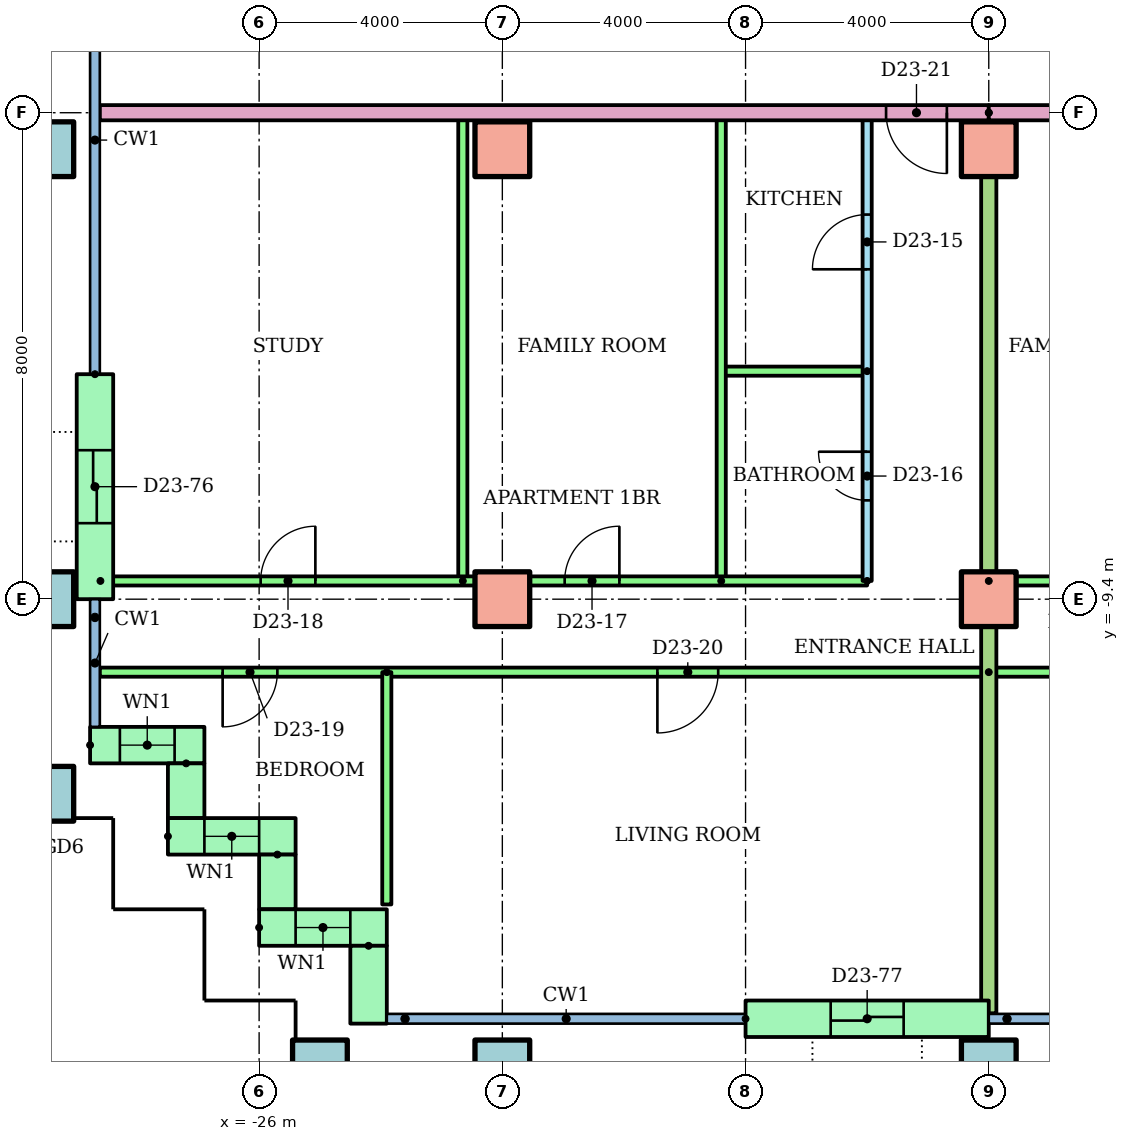
"""IFC4 building model, lengths in metres.
Left out: names, types, materials, properties, quantities, classifications, styles, units other than length and angle.
Written with IfcOpenShell. Run it as: python <this file> out.ifc"""

import sys

from ifc_helpers import new_model, si_unit, direction, frame, frame_2d, origin, origin_2d, place, context, subcontext, project, spatial, rectangle, hollow_rectangle, extrude, element, fill, save


model = new_model("IFC4")
c1 = context("Model", 3, precision=1e-05, world=origin(), true_north=direction((0.0, 1.0)))
c2 = subcontext(c1, "Body", "Model", "MODEL_VIEW")
j1 = project(units=[si_unit("LENGTHUNIT", "METRE"), si_unit("PLANEANGLEUNIT", "RADIAN")], contexts=[c1])
p1 = place(None, origin())
s1 = spatial("IfcSite", under=j1, at=p1, CompositionType="ELEMENT")
p2 = place(p1, origin())
s2 = spatial("IfcBuilding", under=s1, at=p2, CompositionType="ELEMENT")
p3 = place(p2, frame((0.0, 0.0, 90.3)))
s3 = spatial("IfcBuildingStorey", under=s2, at=p3, CompositionType="ELEMENT", Elevation=90.3)
for number, where in (
    (1, (-25.0, -17.1, 0.0)),
    (2, (-22.0, -17.1, 0.0)),
    (3, (-14.0, -17.1, 0.0)),
    (4, (-29.5, -12.6, 0.0)),
    (5, (-29.5, -9.4, 0.0)),
):
    element("IfcColumn", number, at=place(p3, frame(where)), inside=s3, PredefinedType="COLUMN", context=c2, shape_type="SweptSolid", body=[
        extrude(hollow_rectangle(XDim=0.9, YDim=0.9, WallThickness=0.045, at=origin_2d()), origin(), (0.0, 0.0, 1.0), 3.2),
    ])
for number, where in (
    (6, (-22.0, -9.4, 0.0)),
    (7, (-14.0, -9.4, 0.0)),
):
    element("IfcColumn", number, at=place(p3, frame(where)), inside=s3, PredefinedType="COLUMN", context=c2, shape_type="SweptSolid", body=[
        extrude(rectangle(XDim=0.9, YDim=0.9, at=origin_2d()), origin(), (0.0, 0.0, 1.0), 3.2),
    ])
p4 = place(p3, frame((-29.5, -2.0, 0.0)))
e8 = element("IfcColumn", 8, at=p4, inside=s3, PredefinedType="COLUMN", context=c2, shape_type="SweptSolid", body=[
    extrude(hollow_rectangle(XDim=0.9, YDim=0.9, WallThickness=0.045, at=origin_2d()), origin(), (0.0, 0.0, 1.0), 3.2),
])
for number, where in (
    (9, (-22.0, -2.0, 0.0)),
    (10, (-14.0, -2.0, 0.0)),
):
    element("IfcColumn", number, at=place(p3, frame(where)), inside=s3, PredefinedType="COLUMN", context=c2, shape_type="SweptSolid", body=[
        extrude(rectangle(XDim=0.9, YDim=0.9, at=origin_2d()), origin(), (0.0, 0.0, 1.0), 3.2),
    ])
p5 = place(p3, frame((-28.7, -5.7, 0.0), z_axis=(0.0, 0.0, 1.0), x_axis=(0.0, -1.0, 0.0)))
e11 = element("IfcWall", 11, at=p5, inside=s3, PredefinedType="STANDARD", context=c2, shape_type="SweptSolid", body=[
    extrude(rectangle(XDim=3.7, YDim=0.6, at=frame_2d((1.85, 0.0))), origin(), (0.0, 0.0, 1.0), 2.92),
])
p6 = place(p5, frame((1.25, 0.0, 0.0)))
e12 = element("IfcOpeningElement", 12, at=p6, cuts=e11, PredefinedType="OPENING", context=c2, shape_type="SweptSolid", body=[
    extrude(rectangle(XDim=1.2, YDim=2.1, at=frame_2d((0.6, 1.05))), frame((0.0, 0.31, 0.0), z_axis=(0.0, -1.0, 0.0), x_axis=(1.0, 0.0, 0.0)), (0.0, 0.0, 1.0), 0.62),
])
p7 = place(p3, frame((-28.78, -11.8, 0.0)))
e13 = element("IfcWall", 13, at=p7, inside=s3, PredefinedType="STANDARD", context=c2, shape_type="SweptSolid", body=[
    extrude(rectangle(XDim=1.88, YDim=0.6, at=frame_2d((0.94, 0.0))), origin(), (0.0, 0.0, 1.0), 2.92),
])
p8 = place(p7, frame((0.49, 0.0, 0.9)))
e14 = element("IfcOpeningElement", 14, at=p8, cuts=e13, PredefinedType="OPENING", context=c2, shape_type="SweptSolid", body=[
    extrude(rectangle(XDim=0.9, YDim=1.5, at=frame_2d((0.45, 0.75))), frame((0.0, 0.31, 0.0), z_axis=(0.0, -1.0, 0.0), x_axis=(1.0, 0.0, 0.0)), (0.0, 0.0, 1.0), 0.62),
])
p9 = place(p3, frame((-27.2, -12.1, 0.0), z_axis=(0.0, 0.0, 1.0), x_axis=(0.0, -1.0, 0.0)))
e15 = element("IfcWall", 15, at=p9, inside=s3, PredefinedType="STANDARD", context=c2, shape_type="SweptSolid", body=[
    extrude(rectangle(XDim=0.9, YDim=0.6, at=frame_2d((0.45, 0.0))), origin(), (0.0, 0.0, 1.0), 2.92),
])
p10 = place(p3, frame((-27.5, -13.3, 0.0)))
e16 = element("IfcWall", 16, at=p10, inside=s3, PredefinedType="STANDARD", context=c2, shape_type="SweptSolid", body=[
    extrude(rectangle(XDim=2.1, YDim=0.6, at=frame_2d((1.05, 0.0))), origin(), (0.0, 0.0, 1.0), 2.92),
])
p11 = place(p10, frame((0.6, 0.0, 0.9)))
e17 = element("IfcOpeningElement", 17, at=p11, cuts=e16, PredefinedType="OPENING", context=c2, shape_type="SweptSolid", body=[
    extrude(rectangle(XDim=0.9, YDim=1.5, at=frame_2d((0.45, 0.75))), frame((0.0, 0.31, 0.0), z_axis=(0.0, -1.0, 0.0), x_axis=(1.0, 0.0, 0.0)), (0.0, 0.0, 1.0), 0.62),
])
p12 = place(p3, frame((-25.7, -13.6, 0.0), z_axis=(0.0, 0.0, 1.0), x_axis=(0.0, -1.0, 0.0)))
e18 = element("IfcWall", 18, at=p12, inside=s3, PredefinedType="STANDARD", context=c2, shape_type="SweptSolid", body=[
    extrude(rectangle(XDim=0.9, YDim=0.6, at=frame_2d((0.45, 0.0))), origin(), (0.0, 0.0, 1.0), 2.92),
])
p13 = place(p3, frame((-26.0, -14.8, 0.0)))
e19 = element("IfcWall", 19, at=p13, inside=s3, PredefinedType="STANDARD", context=c2, shape_type="SweptSolid", body=[
    extrude(rectangle(XDim=2.1, YDim=0.6, at=frame_2d((1.05, 0.0))), origin(), (0.0, 0.0, 1.0), 2.92),
])
p14 = place(p13, frame((0.6, 0.0, 0.9)))
e20 = element("IfcOpeningElement", 20, at=p14, cuts=e19, PredefinedType="OPENING", context=c2, shape_type="SweptSolid", body=[
    extrude(rectangle(XDim=0.9, YDim=1.5, at=frame_2d((0.45, 0.75))), frame((0.0, 0.31, 0.0), z_axis=(0.0, -1.0, 0.0), x_axis=(1.0, 0.0, 0.0)), (0.0, 0.0, 1.0), 0.62),
])
p15 = place(p3, frame((-24.2, -15.1, 0.0), z_axis=(0.0, 0.0, 1.0), x_axis=(0.0, -1.0, 0.0)))
e21 = element("IfcWall", 21, at=p15, inside=s3, PredefinedType="STANDARD", context=c2, shape_type="SweptSolid", body=[
    extrude(rectangle(XDim=1.28, YDim=0.6, at=frame_2d((0.64, 0.0))), origin(), (0.0, 0.0, 1.0), 2.92),
])
p16 = place(p3, frame((-18.0, -16.3, 0.0)))
e22 = element("IfcWall", 22, at=p16, inside=s3, PredefinedType="STANDARD", context=c2, shape_type="SweptSolid", body=[
    extrude(rectangle(XDim=4.0, YDim=0.6, at=frame_2d((2.0, 0.0))), origin(), (0.0, 0.0, 1.0), 2.92),
])
p17 = place(p16, frame((1.4, 0.0, 0.0)))
e23 = element("IfcOpeningElement", 23, at=p17, cuts=e22, PredefinedType="OPENING", context=c2, shape_type="SweptSolid", body=[
    extrude(rectangle(XDim=1.2, YDim=2.1, at=frame_2d((0.6, 1.05))), frame((0.0, 0.31, 0.0), z_axis=(0.0, -1.0, 0.0), x_axis=(1.0, 0.0, 0.0)), (0.0, 0.0, 1.0), 0.62),
])
p18 = place(p3, frame((-16.0, -9.1, 0.0), z_axis=(0.0, 0.0, 1.0), x_axis=(0.0, 1.0, 0.0)))
e24 = element("IfcWall", 24, at=p18, inside=s3, PredefinedType="PARTITIONING", context=c2, shape_type="SweptSolid", body=[
    extrude(rectangle(XDim=7.7, YDim=0.15, at=frame_2d((3.85, 0.0))), origin(), (0.0, 0.0, 1.0), 2.4),
])
p19 = place(p18, frame((5.125, 0.0, 0.0)))
e25 = element("IfcOpeningElement", 25, at=p19, cuts=e24, PredefinedType="OPENING", context=c2, shape_type="SweptSolid", body=[
    extrude(rectangle(XDim=0.9, YDim=2.1, at=frame_2d((0.45, 1.05))), frame((0.0, 0.085, 0.0), z_axis=(0.0, -1.0, 0.0), x_axis=(1.0, 0.0, 0.0)), (0.0, 0.0, 1.0), 0.17),
])
p20 = place(p18, frame((1.325, 0.0, 0.0)))
e26 = element("IfcOpeningElement", 26, at=p20, cuts=e24, PredefinedType="OPENING", context=c2, shape_type="SweptSolid", body=[
    extrude(rectangle(XDim=0.8, YDim=2.1, at=frame_2d((0.4, 1.05))), frame((0.0, 0.085, 0.0), z_axis=(0.0, -1.0, 0.0), x_axis=(1.0, 0.0, 0.0)), (0.0, 0.0, 1.0), 0.17),
])
p21 = place(p3, frame((-16.0, -5.65, 0.0), z_axis=(0.0, 0.0, 1.0), x_axis=(-1.0, 0.0, 0.0)))
e27 = element("IfcWall", 27, at=p21, inside=s3, PredefinedType="PARTITIONING", context=c2, shape_type="SweptSolid", body=[
    extrude(rectangle(XDim=2.4, YDim=0.15, at=frame_2d((1.2, 0.0))), origin(), (0.0, 0.0, 1.0), 2.4),
])
for number, where, z_axis, x_axis in (
    (28, (-18.4, -9.1, 0.0), (0.0, 0.0, 1.0), (0.0, 1.0, 0.0)),
    (29, (-22.65, -9.1, 0.0), (0.0, 0.0, 1.0), (0.0, 1.0, 0.0)),
):
    element("IfcWall", number, at=place(p3, frame(where, z_axis=z_axis, x_axis=x_axis)), inside=s3, PredefinedType="PARTITIONING", context=c2, shape_type="SweptSolid", body=[
        extrude(rectangle(XDim=7.7, YDim=0.15, at=frame_2d((3.85, 0.0))), origin(), (0.0, 0.0, 1.0), 2.4),
    ])
p22 = place(p3, frame((-28.61, -9.1, 0.0)))
e30 = element("IfcWall", 30, at=p22, inside=s3, PredefinedType="PARTITIONING", context=c2, shape_type="SweptSolid", body=[
    extrude(rectangle(XDim=12.61, YDim=0.15, at=frame_2d((6.305, 0.0))), origin(), (0.0, 0.0, 1.0), 2.4),
])
p23 = place(p22, frame((7.635, 0.0, 0.0)))
e31 = element("IfcOpeningElement", 31, at=p23, cuts=e30, PredefinedType="OPENING", context=c2, shape_type="SweptSolid", body=[
    extrude(rectangle(XDim=0.9, YDim=2.1, at=frame_2d((0.45, 1.05))), frame((0.0, 0.085, 0.0), z_axis=(0.0, -1.0, 0.0), x_axis=(1.0, 0.0, 0.0)), (0.0, 0.0, 1.0), 0.17),
])
p24 = place(p22, frame((2.635, 0.0, 0.0)))
e32 = element("IfcOpeningElement", 32, at=p24, cuts=e30, PredefinedType="OPENING", context=c2, shape_type="SweptSolid", body=[
    extrude(rectangle(XDim=0.9, YDim=2.1, at=frame_2d((0.45, 1.05))), frame((0.0, 0.085, 0.0), z_axis=(0.0, -1.0, 0.0), x_axis=(1.0, 0.0, 0.0)), (0.0, 0.0, 1.0), 0.17),
])
p25 = place(p3, frame((-14.0, -10.6, 0.0), z_axis=(0.0, 0.0, 1.0), x_axis=(-1.0, 0.0, 0.0)))
e33 = element("IfcWall", 33, at=p25, inside=s3, PredefinedType="PARTITIONING", context=c2, shape_type="SweptSolid", body=[
    extrude(rectangle(XDim=14.62, YDim=0.15, at=frame_2d((7.31, 0.0))), origin(), (0.0, 0.0, 1.0), 2.4),
])
p26 = place(p25, frame((11.7, 0.0, 0.0)))
e34 = element("IfcOpeningElement", 34, at=p26, cuts=e33, PredefinedType="OPENING", context=c2, shape_type="SweptSolid", body=[
    extrude(rectangle(XDim=0.9, YDim=2.1, at=frame_2d((0.45, 1.05))), frame((0.0, 0.085, 0.0), z_axis=(0.0, -1.0, 0.0), x_axis=(1.0, 0.0, 0.0)), (0.0, 0.0, 1.0), 0.17),
])
p27 = place(p25, frame((4.45, 0.0, 0.0)))
e35 = element("IfcOpeningElement", 35, at=p27, cuts=e33, PredefinedType="OPENING", context=c2, shape_type="SweptSolid", body=[
    extrude(rectangle(XDim=1.0, YDim=2.1, at=frame_2d((0.5, 1.05))), frame((0.0, 0.085, 0.0), z_axis=(0.0, -1.0, 0.0), x_axis=(1.0, 0.0, 0.0)), (0.0, 0.0, 1.0), 0.17),
])
p28 = place(p3, frame((-23.9, -10.6, 0.0), z_axis=(0.0, 0.0, 1.0), x_axis=(0.0, -1.0, 0.0)))
e36 = element("IfcWall", 36, at=p28, inside=s3, PredefinedType="PARTITIONING", context=c2, shape_type="SweptSolid", body=[
    extrude(rectangle(XDim=3.82, YDim=0.15, at=frame_2d((1.91, 0.0))), origin(), (0.0, 0.0, 1.0), 2.4),
])
p29 = place(p3, frame((-14.0, -9.1, 0.0)))
e37 = element("IfcWall", 37, at=p29, inside=s3, PredefinedType="PARTITIONING", context=c2, shape_type="SweptSolid", body=[
    extrude(rectangle(XDim=14.0, YDim=0.15, at=frame_2d((7.0, 0.0))), origin(), (0.0, 0.0, 1.0), 2.4),
])
p30 = place(p29, frame((8.775, 0.0, 0.0)))
e38 = element("IfcOpeningElement", 38, at=p30, cuts=e37, PredefinedType="OPENING", context=c2, shape_type="SweptSolid", body=[
    extrude(rectangle(XDim=0.9, YDim=2.1, at=frame_2d((0.45, 1.05))), frame((0.0, 0.085, 0.0), z_axis=(0.0, -1.0, 0.0), x_axis=(1.0, 0.0, 0.0)), (0.0, 0.0, 1.0), 0.17),
])
p31 = place(p29, frame((4.525, 0.0, 0.0)))
e39 = element("IfcOpeningElement", 39, at=p31, cuts=e37, PredefinedType="OPENING", context=c2, shape_type="SweptSolid", body=[
    extrude(rectangle(XDim=0.9, YDim=2.1, at=frame_2d((0.45, 1.05))), frame((0.0, 0.085, 0.0), z_axis=(0.0, -1.0, 0.0), x_axis=(1.0, 0.0, 0.0)), (0.0, 0.0, 1.0), 0.17),
])
p32 = place(p29, frame((1.1, 0.0, 0.0)))
e40 = element("IfcOpeningElement", 40, at=p32, cuts=e37, PredefinedType="OPENING", context=c2, shape_type="SweptSolid", body=[
    extrude(rectangle(XDim=0.9, YDim=2.1, at=frame_2d((0.45, 1.05))), frame((0.0, 0.085, 0.0), z_axis=(0.0, -1.0, 0.0), x_axis=(1.0, 0.0, 0.0)), (0.0, 0.0, 1.0), 0.17),
])
p33 = place(p3, frame((2.0, -10.6, 0.0), z_axis=(0.0, 0.0, 1.0), x_axis=(-1.0, 0.0, 0.0)))
e41 = element("IfcWall", 41, at=p33, inside=s3, PredefinedType="PARTITIONING", context=c2, shape_type="SweptSolid", body=[
    extrude(rectangle(XDim=16.0, YDim=0.15, at=frame_2d((8.0, 0.0))), origin(), (0.0, 0.0, 1.0), 2.4),
])
p34 = place(p33, frame((13.55, 0.0, 0.0)))
e42 = element("IfcOpeningElement", 42, at=p34, cuts=e41, PredefinedType="OPENING", context=c2, shape_type="SweptSolid", body=[
    extrude(rectangle(XDim=0.9, YDim=2.1, at=frame_2d((0.45, 1.05))), frame((0.0, 0.085, 0.0), z_axis=(0.0, -1.0, 0.0), x_axis=(1.0, 0.0, 0.0)), (0.0, 0.0, 1.0), 0.17),
])
p35 = place(p33, frame((9.55, 0.0, 0.0)))
e43 = element("IfcOpeningElement", 43, at=p35, cuts=e41, PredefinedType="OPENING", context=c2, shape_type="SweptSolid", body=[
    extrude(rectangle(XDim=0.9, YDim=2.1, at=frame_2d((0.45, 1.05))), frame((0.0, 0.085, 0.0), z_axis=(0.0, -1.0, 0.0), x_axis=(1.0, 0.0, 0.0)), (0.0, 0.0, 1.0), 0.17),
])
p36 = place(p33, frame((5.55, 0.0, 0.0)))
e44 = element("IfcOpeningElement", 44, at=p36, cuts=e41, PredefinedType="OPENING", context=c2, shape_type="SweptSolid", body=[
    extrude(rectangle(XDim=0.9, YDim=2.1, at=frame_2d((0.45, 1.05))), frame((0.0, 0.085, 0.0), z_axis=(0.0, -1.0, 0.0), x_axis=(1.0, 0.0, 0.0)), (0.0, 0.0, 1.0), 0.17),
])
p37 = place(p33, frame((1.5, 0.0, 0.0)))
e45 = element("IfcOpeningElement", 45, at=p37, cuts=e41, PredefinedType="OPENING", context=c2, shape_type="SweptSolid", body=[
    extrude(rectangle(XDim=1.0, YDim=2.1, at=frame_2d((0.5, 1.05))), frame((0.0, 0.085, 0.0), z_axis=(0.0, -1.0, 0.0), x_axis=(1.0, 0.0, 0.0)), (0.0, 0.0, 1.0), 0.17),
])
p38 = place(p3, frame((-14.0, -1.4, 0.0), z_axis=(0.0, 0.0, 1.0), x_axis=(0.0, -1.0, 0.0)))
e46 = element("IfcWall", 46, at=p38, inside=s3, PredefinedType="PARTITIONING", context=c2, shape_type="SweptSolid", body=[
    extrude(rectangle(XDim=14.81, YDim=0.25, at=frame_2d((7.405, 0.0))), origin(), (0.0, 0.0, 1.0), 2.4),
])
p39 = place(p3, frame((-14.0, -1.4, 0.0), z_axis=(0.0, 0.0, 1.0), x_axis=(-1.0, 0.0, 0.0)))
e47 = element("IfcWall", 47, at=p39, inside=s3, PredefinedType="PARTITIONING", context=c2, shape_type="SweptSolid", body=[
    extrude(rectangle(XDim=14.62, YDim=0.25, at=frame_2d((7.31, 0.0))), origin(), (0.0, 0.0, 1.0), 2.4),
])
p40 = place(p39, frame((0.689, 0.0, 0.0)))
e48 = element("IfcOpeningElement", 48, at=p40, cuts=e47, PredefinedType="OPENING", context=c2, shape_type="SweptSolid", body=[
    extrude(rectangle(XDim=1.0, YDim=2.1, at=frame_2d((0.5, 1.05))), frame((0.0, 0.135, 0.0), z_axis=(0.0, -1.0, 0.0), x_axis=(1.0, 0.0, 0.0)), (0.0, 0.0, 1.0), 0.27),
])
p41 = place(p3, frame((14.0, -1.4, 0.0), z_axis=(0.0, 0.0, 1.0), x_axis=(-1.0, 0.0, 0.0)))
e49 = element("IfcWall", 49, at=p41, inside=s3, PredefinedType="PARTITIONING", context=c2, shape_type="SweptSolid", body=[
    extrude(rectangle(XDim=28.0, YDim=0.25, at=frame_2d((14.0, 0.0))), origin(), (0.0, 0.0, 1.0), 2.4),
])
p42 = place(p41, frame((12.689, 0.0, 0.0)))
e50 = element("IfcOpeningElement", 50, at=p42, cuts=e49, PredefinedType="OPENING", context=c2, shape_type="SweptSolid", body=[
    extrude(rectangle(XDim=1.0, YDim=2.1, at=frame_2d((0.5, 1.05))), frame((0.0, 0.135, 0.0), z_axis=(0.0, -1.0, 0.0), x_axis=(1.0, 0.0, 0.0)), (0.0, 0.0, 1.0), 0.27),
])
p43 = place(p41, frame((10.311, 0.0, 0.0)))
e51 = element("IfcOpeningElement", 51, at=p43, cuts=e49, PredefinedType="OPENING", context=c2, shape_type="SweptSolid", body=[
    extrude(rectangle(XDim=1.0, YDim=2.1, at=frame_2d((0.5, 1.05))), frame((0.0, 0.135, 0.0), z_axis=(0.0, -1.0, 0.0), x_axis=(1.0, 0.0, 0.0)), (0.0, 0.0, 1.0), 0.27),
])
p44 = place(p8, origin())
e52 = element("IfcWindow", 52, at=p44, inside=s3, PartitioningType="SINGLE_PANEL", PredefinedType="WINDOW", context=c2, shape_type="SweptSolid", body=[
    extrude(rectangle(XDim=0.9, YDim=1.5, at=frame_2d((0.45, 0.75))), frame((0.0, 0.03, 0.0), z_axis=(0.0, -1.0, 0.0), x_axis=(1.0, 0.0, 0.0)), (0.0, 0.0, 1.0), 0.06),
])
fill(e14, e52)
p45 = place(p11, origin())
e53 = element("IfcWindow", 53, at=p45, inside=s3, PartitioningType="SINGLE_PANEL", PredefinedType="WINDOW", context=c2, shape_type="SweptSolid", body=[
    extrude(rectangle(XDim=0.9, YDim=1.5, at=frame_2d((0.45, 0.75))), frame((0.0, 0.03, 0.0), z_axis=(0.0, -1.0, 0.0), x_axis=(1.0, 0.0, 0.0)), (0.0, 0.0, 1.0), 0.06),
])
fill(e17, e53)
p46 = place(p14, origin())
e54 = element("IfcWindow", 54, at=p46, inside=s3, PartitioningType="SINGLE_PANEL", PredefinedType="WINDOW", context=c2, shape_type="SweptSolid", body=[
    extrude(rectangle(XDim=0.9, YDim=1.5, at=frame_2d((0.45, 0.75))), frame((0.0, 0.03, 0.0), z_axis=(0.0, -1.0, 0.0), x_axis=(1.0, 0.0, 0.0)), (0.0, 0.0, 1.0), 0.06),
])
fill(e20, e54)
p47 = place(p19, origin())
e55 = element("IfcDoor", 55, at=p47, inside=s3, OperationType="SINGLE_SWING_LEFT", PredefinedType="DOOR", context=c2, shape_type="SweptSolid", body=[
    extrude(rectangle(XDim=0.9, YDim=2.1, at=frame_2d((0.45, 1.05))), frame((0.0, 0.025, 0.0), z_axis=(0.0, -1.0, 0.0), x_axis=(1.0, 0.0, 0.0)), (0.0, 0.0, 1.0), 0.05),
])
fill(e25, e55)
p48 = place(p20, origin())
e56 = element("IfcDoor", 56, at=p48, inside=s3, OperationType="SINGLE_SWING_RIGHT", PredefinedType="DOOR", context=c2, shape_type="SweptSolid", body=[
    extrude(rectangle(XDim=0.8, YDim=2.1, at=frame_2d((0.4, 1.05))), frame((0.0, 0.025, 0.0), z_axis=(0.0, -1.0, 0.0), x_axis=(1.0, 0.0, 0.0)), (0.0, 0.0, 1.0), 0.05),
])
fill(e26, e56)
p49 = place(p23, origin())
e57 = element("IfcDoor", 57, at=p49, inside=s3, OperationType="SINGLE_SWING_RIGHT", PredefinedType="DOOR", context=c2, shape_type="SweptSolid", body=[
    extrude(rectangle(XDim=0.9, YDim=2.1, at=frame_2d((0.45, 1.05))), frame((0.0, 0.025, 0.0), z_axis=(0.0, -1.0, 0.0), x_axis=(1.0, 0.0, 0.0)), (0.0, 0.0, 1.0), 0.05),
])
fill(e31, e57)
p50 = place(p24, origin())
e58 = element("IfcDoor", 58, at=p50, inside=s3, OperationType="SINGLE_SWING_RIGHT", PredefinedType="DOOR", context=c2, shape_type="SweptSolid", body=[
    extrude(rectangle(XDim=0.9, YDim=2.1, at=frame_2d((0.45, 1.05))), frame((0.0, 0.025, 0.0), z_axis=(0.0, -1.0, 0.0), x_axis=(1.0, 0.0, 0.0)), (0.0, 0.0, 1.0), 0.05),
])
fill(e32, e58)
p51 = place(p26, origin())
e59 = element("IfcDoor", 59, at=p51, inside=s3, OperationType="SINGLE_SWING_RIGHT", PredefinedType="DOOR", context=c2, shape_type="SweptSolid", body=[
    extrude(rectangle(XDim=0.9, YDim=2.1, at=frame_2d((0.45, 1.05))), frame((0.0, 0.025, 0.0), z_axis=(0.0, -1.0, 0.0), x_axis=(1.0, 0.0, 0.0)), (0.0, 0.0, 1.0), 0.05),
])
fill(e34, e59)
p52 = place(p27, origin())
e60 = element("IfcDoor", 60, at=p52, inside=s3, OperationType="SINGLE_SWING_RIGHT", PredefinedType="DOOR", context=c2, shape_type="SweptSolid", body=[
    extrude(rectangle(XDim=1.0, YDim=2.1, at=frame_2d((0.5, 1.05))), frame((0.0, 0.025, 0.0), z_axis=(0.0, -1.0, 0.0), x_axis=(1.0, 0.0, 0.0)), (0.0, 0.0, 1.0), 0.05),
])
fill(e35, e60)
p53 = place(p40, origin())
e61 = element("IfcDoor", 61, at=p53, inside=s3, OperationType="SINGLE_SWING_LEFT", PredefinedType="DOOR", context=c2, shape_type="SweptSolid", body=[
    extrude(rectangle(XDim=1.0, YDim=2.1, at=frame_2d((0.5, 1.05))), frame((0.0, 0.025, 0.0), z_axis=(0.0, -1.0, 0.0), x_axis=(1.0, 0.0, 0.0)), (0.0, 0.0, 1.0), 0.05),
])
fill(e48, e61)
p54 = place(p6, origin())
e62 = element("IfcDoor", 62, at=p54, inside=s3, OperationType="SLIDING_TO_LEFT", PredefinedType="DOOR", context=c2, shape_type="SweptSolid", body=[
    extrude(rectangle(XDim=1.2, YDim=2.1, at=frame_2d((0.6, 1.05))), frame((0.0, 0.025, 0.0), z_axis=(0.0, -1.0, 0.0), x_axis=(1.0, 0.0, 0.0)), (0.0, 0.0, 1.0), 0.05),
])
fill(e12, e62)
p55 = place(p17, origin())
e63 = element("IfcDoor", 63, at=p55, inside=s3, OperationType="SLIDING_TO_LEFT", PredefinedType="DOOR", context=c2, shape_type="SweptSolid", body=[
    extrude(rectangle(XDim=1.2, YDim=2.1, at=frame_2d((0.6, 1.05))), frame((0.0, 0.025, 0.0), z_axis=(0.0, -1.0, 0.0), x_axis=(1.0, 0.0, 0.0)), (0.0, 0.0, 1.0), 0.05),
])
fill(e23, e63)
save(model, sys.argv[1])
